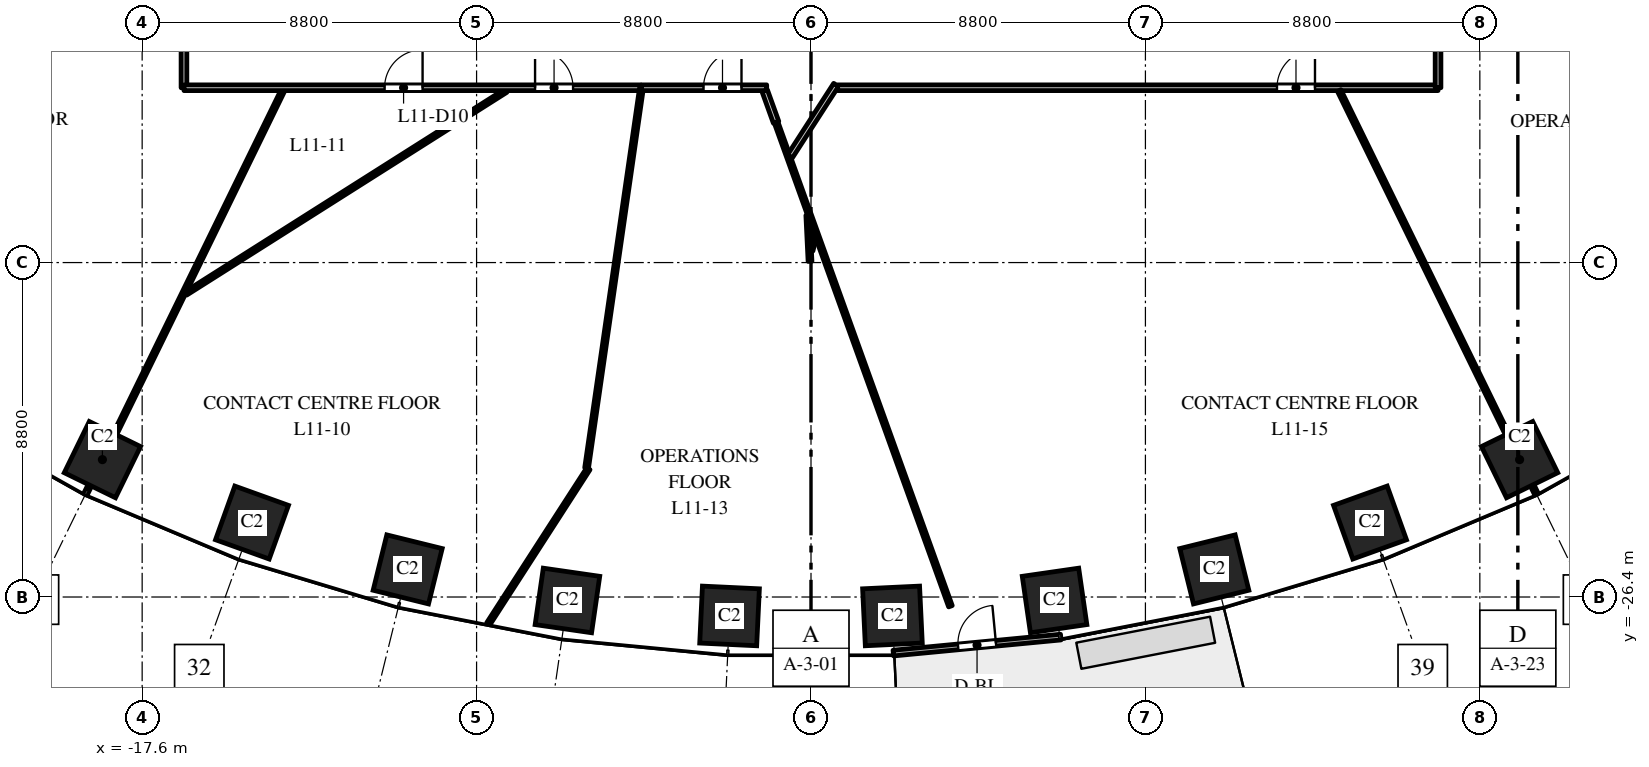
"""IFC4 building model, lengths in metres.
Left out: names, types, materials, properties, quantities, classifications, styles, units other than length and angle.
Written with IfcOpenShell. Run it as: python <this file> out.ifc"""

import sys

from ifc_helpers import new_model, si_unit, direction, frame, frame_2d, origin, origin_2d, place, context, subcontext, project, spatial, rectangle, extrude, element, fill, save


model = new_model("IFC4")
c1 = context("Model", 3, precision=1e-05, world=origin(), true_north=direction((0.0, 1.0)))
c2 = subcontext(c1, "Body", "Model", "MODEL_VIEW")
j1 = project(units=[si_unit("LENGTHUNIT", "METRE"), si_unit("PLANEANGLEUNIT", "RADIAN")], contexts=[c1])
p1 = place(None, origin())
s1 = spatial("IfcSite", under=j1, at=p1, CompositionType="ELEMENT")
p2 = place(p1, origin())
s2 = spatial("IfcBuilding", under=s1, at=p2, CompositionType="ELEMENT")
p3 = place(p2, frame((0.0, 0.0, 54.5)))
s3 = spatial("IfcBuildingStorey", under=s2, at=p3, CompositionType="ELEMENT", Elevation=54.5)
for number, where, z_axis, x_axis in (
    (1, (-18.646, -22.785, 0.0), (0.0, 0.0, 1.0), (0.898, -0.439, 0.0)),
    (2, (-14.709, -24.441, 0.0), (0.0, 0.0, 1.0), (0.941, -0.338, 0.0)),
    (3, (-10.613, -25.674, 0.0), (0.0, 0.0, 1.0), (0.971, -0.24, 0.0)),
    (4, (-6.409, -26.491, 0.0), (0.0, 0.0, 1.0), (0.99, -0.143, 0.0)),
    (5, (-2.143, -26.898, 0.0), (0.0, 0.0, 1.0), (0.999, -0.048, 0.0)),
    (6, (2.143, -26.898, 0.0), (0.0, 0.0, 1.0), (0.999, 0.048, 0.0)),
    (7, (6.409, -26.491, 0.0), (0.0, 0.0, 1.0), (0.99, 0.143, 0.0)),
    (8, (10.613, -25.674, 0.0), (0.0, 0.0, 1.0), (0.971, 0.24, 0.0)),
    (9, (14.709, -24.441, 0.0), (0.0, 0.0, 1.0), (0.941, 0.338, 0.0)),
    (10, (18.646, -22.785, 0.0), (0.0, 0.0, 1.0), (0.898, 0.439, 0.0)),
):
    element("IfcColumn", number, at=place(p3, frame(where, z_axis=z_axis, x_axis=x_axis)), inside=s3, PredefinedType="COLUMN", context=c2, shape_type="SweptSolid", body=[
        extrude(rectangle(XDim=1.5, YDim=1.5, at=origin_2d()), origin(), (0.0, 0.0, 1.0), 4.0),
    ])
p4 = place(p3, frame((2.166, -27.875, 0.0), z_axis=(0.0, 0.0, 1.0), x_axis=(0.995473879823, 0.095035543824, 0.0)))
e11 = element("IfcWall", 11, at=p4, inside=s3, PredefinedType="STANDARD", context=c2, shape_type="SweptSolid", body=[
    extrude(rectangle(XDim=4.426, YDim=0.15, at=frame_2d((2.213, 0.0))), origin(), (0.0, 0.0, 1.0), 3.7),
])
p5 = place(p4, frame((1.713, 0.0, 0.0)))
e12 = element("IfcOpeningElement", 12, at=p5, cuts=e11, PredefinedType="OPENING", context=c2, shape_type="SweptSolid", body=[
    extrude(rectangle(XDim=1.0, YDim=2.4, at=frame_2d((0.5, 1.2))), frame((0.0, 0.085, 0.0), z_axis=(0.0, -1.0, 0.0), x_axis=(1.0, 0.0, 0.0)), (0.0, 0.0, 1.0), 0.17),
])
p6 = place(p3, frame((-19.086, -23.685, 0.0), z_axis=(0.0, 0.0, 1.0), x_axis=(0.439199750603, 0.898389436197, 0.0)))
e13 = element("IfcWall", 13, at=p6, inside=s3, PredefinedType="PARTITIONING", context=c2, shape_type="SweptSolid", body=[
    extrude(rectangle(XDim=11.81, YDim=0.1, at=frame_2d((5.905, 0.0))), origin(), (0.0, 0.0, 1.0), 3.7),
])
p7 = place(p3, frame((-16.452, -18.412, 0.0), z_axis=(0.0, 0.0, 1.0), x_axis=(0.84481391066, 0.535060236194, 0.0)))
e14 = element("IfcWall", 14, at=p7, inside=s3, PredefinedType="PARTITIONING", context=c2, shape_type="SweptSolid", body=[
    extrude(rectangle(XDim=9.971, YDim=0.1, at=frame_2d((4.986, 0.0))), origin(), (0.0, 0.0, 1.0), 2.85),
])
p8 = place(p3, frame((-16.5, -13.0, 0.0), z_axis=(0.0, 0.0, 1.0), x_axis=(0.0, 1.0, 0.0)))
e15 = element("IfcWall", 15, at=p8, inside=s3, PredefinedType="PARTITIONING", context=c2, shape_type="SweptSolid", body=[
    extrude(rectangle(XDim=2.3, YDim=0.15, at=frame_2d((1.15, 0.0))), origin(), (0.0, 0.0, 1.0), 2.75),
])
p9 = place(p3, frame((-16.5, -13.0, 0.0), z_axis=(0.0, 0.0, 1.0), x_axis=(1.0, 0.0, 0.0)))
e16 = element("IfcWall", 16, at=p9, inside=s3, PredefinedType="PARTITIONING", context=c2, shape_type="SweptSolid", body=[
    extrude(rectangle(XDim=12.021, YDim=0.15, at=frame_2d((6.01, 0.0))), origin(), (0.0, 0.0, 1.0), 2.85),
])
p10 = place(p9, frame((9.239, 0.0, 0.0)))
e17 = element("IfcOpeningElement", 17, at=p10, cuts=e16, PredefinedType="OPENING", context=c2, shape_type="SweptSolid", body=[
    extrude(rectangle(XDim=1.0, YDim=2.1, at=frame_2d((0.5, 1.05))), frame((0.0, 0.085, 0.0), z_axis=(0.0, -1.0, 0.0), x_axis=(1.0, 0.0, 0.0)), (0.0, 0.0, 1.0), 0.17),
])
p11 = place(p9, frame((5.279, 0.0, 0.0)))
e18 = element("IfcOpeningElement", 18, at=p11, cuts=e16, PredefinedType="OPENING", context=c2, shape_type="SweptSolid", body=[
    extrude(rectangle(XDim=1.0, YDim=2.1, at=frame_2d((0.5, 1.05))), frame((0.0, 0.085, 0.0), z_axis=(0.0, -1.0, 0.0), x_axis=(1.0, 0.0, 0.0)), (0.0, 0.0, 1.0), 0.17),
])
p12 = place(p3, frame((-8.491, -27.104, 0.0), z_axis=(0.0, 0.0, 1.0), x_axis=(0.542285995048, 0.840193965448, 0.0)))
e19 = element("IfcWall", 19, at=p12, inside=s3, PredefinedType="PARTITIONING", context=c2, shape_type="SweptSolid", body=[
    extrude(rectangle(XDim=4.857, YDim=0.1, at=frame_2d((2.429, 0.0))), origin(), (0.0, 0.0, 1.0), 2.85),
])
p13 = place(p3, frame((-5.905, -23.005, 0.0), z_axis=(0.0, 0.0, 1.0), x_axis=(0.143007570509, 0.98972159458, 0.0)))
e20 = element("IfcWall", 20, at=p13, inside=s3, PredefinedType="PARTITIONING", context=c2, shape_type="SweptSolid", body=[
    extrude(rectangle(XDim=10.105, YDim=0.1, at=frame_2d((5.052, 0.0))), origin(), (0.0, 0.0, 1.0), 3.7),
])
p14 = place(p3, frame((-4.459, -13.0, 0.0), z_axis=(0.0, 0.0, 1.0), x_axis=(1.0, 0.0, 0.0)))
e21 = element("IfcWall", 21, at=p14, inside=s3, PredefinedType="PARTITIONING", context=c2, shape_type="SweptSolid", body=[
    extrude(rectangle(XDim=3.293, YDim=0.15, at=frame_2d((1.646, 0.0))), origin(), (0.0, 0.0, 1.0), 3.7),
])
p15 = place(p14, frame((1.63, 0.0, 0.0)))
e22 = element("IfcOpeningElement", 22, at=p15, cuts=e21, PredefinedType="OPENING", context=c2, shape_type="SweptSolid", body=[
    extrude(rectangle(XDim=1.0, YDim=2.1, at=frame_2d((0.5, 1.05))), frame((0.0, 0.085, 0.0), z_axis=(0.0, -1.0, 0.0), x_axis=(1.0, 0.0, 0.0)), (0.0, 0.0, 1.0), 0.17),
])
p16 = place(p3, frame((-1.218, -13.079, 0.0), z_axis=(0.0, 0.0, 1.0), x_axis=(0.339052677967, -0.940767389722, 0.0)))
e23 = element("IfcWall", 23, at=p16, inside=s3, PredefinedType="PARTITIONING", context=c2, shape_type="SweptSolid", body=[
    extrude(rectangle(XDim=0.882, YDim=0.15, at=frame_2d((0.441, 0.0))), origin(), (0.0, 0.0, 1.0), 2.85),
])
p17 = place(p3, frame((-0.916, -13.918, 0.0), z_axis=(0.0, 0.0, 1.0), x_axis=(0.338982154044, -0.940792803565, 0.0)))
e24 = element("IfcWall", 24, at=p17, inside=s3, PredefinedType="PARTITIONING", context=c2, shape_type="SweptSolid", body=[
    extrude(rectangle(XDim=13.526, YDim=0.1, at=frame_2d((6.763, 0.0))), origin(), (0.0, 0.0, 1.0), 2.85),
])
p18 = place(p3, frame((-0.084, -16.356, 0.0), z_axis=(0.0, 0.0, 1.0), x_axis=(0.047967320325, -0.998848905581, 0.0)))
e25 = element("IfcWall", 25, at=p18, inside=s3, PredefinedType="PARTITIONING", context=c2, shape_type="SweptSolid", body=[
    extrude(rectangle(XDim=1.211, YDim=0.1, at=frame_2d((0.606, 0.0))), origin(), (0.0, 0.0, 1.0), 3.7),
])
p19 = place(p3, frame((-0.554, -14.806, 0.0), z_axis=(0.0, 0.0, 1.0), x_axis=(0.542256038928, 0.840213299256, 0.0)))
e26 = element("IfcWall", 26, at=p19, inside=s3, PredefinedType="PARTITIONING", context=c2, shape_type="SweptSolid", body=[
    extrude(rectangle(XDim=2.239, YDim=0.15, at=frame_2d((1.119, 0.0))), origin(), (0.0, 0.0, 1.0), 3.7),
])
p20 = place(p3, frame((0.002, -17.284, 0.0), z_axis=(0.0, 0.0, 1.0), x_axis=(0.240121592304, 0.970742819139, 0.0)))
e27 = element("IfcWall", 27, at=p20, inside=s3, PredefinedType="PARTITIONING", context=c2, shape_type="SweptSolid", body=[
    extrude(rectangle(XDim=0.405, YDim=0.1, at=frame_2d((0.202, 0.0))), origin(), (0.0, 0.0, 1.0), 3.7),
])
p21 = place(p3, frame((0.701, -13.0, 0.0), z_axis=(0.0, 0.0, 1.0), x_axis=(1.0, 0.0, 0.0)))
e28 = element("IfcWall", 28, at=p21, inside=s3, PredefinedType="PARTITIONING", context=c2, shape_type="SweptSolid", body=[
    extrude(rectangle(XDim=15.799, YDim=0.15, at=frame_2d((7.899, 0.0))), origin(), (0.0, 0.0, 1.0), 2.85),
])
p22 = place(p21, frame((11.561, 0.0, 0.0)))
e29 = element("IfcOpeningElement", 29, at=p22, cuts=e28, PredefinedType="OPENING", context=c2, shape_type="SweptSolid", body=[
    extrude(rectangle(XDim=1.0, YDim=2.1, at=frame_2d((0.5, 1.05))), frame((0.0, 0.085, 0.0), z_axis=(0.0, -1.0, 0.0), x_axis=(1.0, 0.0, 0.0)), (0.0, 0.0, 1.0), 0.17),
])
p23 = place(p3, frame((13.899, -13.075, 0.0), z_axis=(0.0, 0.0, 1.0), x_axis=(0.439199750603, -0.898389436197, 0.0)))
e30 = element("IfcWall", 30, at=p23, inside=s3, PredefinedType="PARTITIONING", context=c2, shape_type="SweptSolid", body=[
    extrude(rectangle(XDim=11.81, YDim=0.1, at=frame_2d((5.905, 0.0))), origin(), (0.0, 0.0, 1.0), 2.85),
])
p24 = place(p3, frame((16.5, -13.0, 0.0), z_axis=(0.0, 0.0, 1.0), x_axis=(0.0, 1.0, 0.0)))
e31 = element("IfcWall", 31, at=p24, inside=s3, PredefinedType="PARTITIONING", context=c2, shape_type="SweptSolid", body=[
    extrude(rectangle(XDim=2.3, YDim=0.15, at=frame_2d((1.15, 0.0))), origin(), (0.0, 0.0, 1.0), 3.7),
])
p25 = place(p5, origin())
e32 = element("IfcDoor", 32, at=p25, inside=s3, OperationType="SINGLE_SWING_RIGHT", PredefinedType="DOOR", context=c2, shape_type="SweptSolid", body=[
    extrude(rectangle(XDim=1.0, YDim=2.4, at=frame_2d((0.5, 1.2))), frame((0.0, 0.025, 0.0), z_axis=(0.0, -1.0, 0.0), x_axis=(1.0, 0.0, 0.0)), (0.0, 0.0, 1.0), 0.05),
])
fill(e12, e32)
p26 = place(p10, origin())
e33 = element("IfcDoor", 33, at=p26, inside=s3, OperationType="SINGLE_SWING_LEFT", PredefinedType="DOOR", context=c2, shape_type="SweptSolid", body=[
    extrude(rectangle(XDim=1.0, YDim=2.1, at=frame_2d((0.5, 1.05))), frame((0.0, 0.025, 0.0), z_axis=(0.0, -1.0, 0.0), x_axis=(1.0, 0.0, 0.0)), (0.0, 0.0, 1.0), 0.05),
])
fill(e17, e33)
p27 = place(p11, origin())
e34 = element("IfcDoor", 34, at=p27, inside=s3, OperationType="SINGLE_SWING_RIGHT", PredefinedType="DOOR", context=c2, shape_type="SweptSolid", body=[
    extrude(rectangle(XDim=1.0, YDim=2.1, at=frame_2d((0.5, 1.05))), frame((0.0, 0.025, 0.0), z_axis=(0.0, -1.0, 0.0), x_axis=(1.0, 0.0, 0.0)), (0.0, 0.0, 1.0), 0.05),
])
fill(e18, e34)
p28 = place(p15, origin())
e35 = element("IfcDoor", 35, at=p28, inside=s3, OperationType="SINGLE_SWING_RIGHT", PredefinedType="DOOR", context=c2, shape_type="SweptSolid", body=[
    extrude(rectangle(XDim=1.0, YDim=2.1, at=frame_2d((0.5, 1.05))), frame((0.0, 0.025, 0.0), z_axis=(0.0, -1.0, 0.0), x_axis=(1.0, 0.0, 0.0)), (0.0, 0.0, 1.0), 0.05),
])
fill(e22, e35)
p29 = place(p22, origin())
e36 = element("IfcDoor", 36, at=p29, inside=s3, OperationType="SINGLE_SWING_RIGHT", PredefinedType="DOOR", context=c2, shape_type="SweptSolid", body=[
    extrude(rectangle(XDim=1.0, YDim=2.1, at=frame_2d((0.5, 1.05))), frame((0.0, 0.025, 0.0), z_axis=(0.0, -1.0, 0.0), x_axis=(1.0, 0.0, 0.0)), (0.0, 0.0, 1.0), 0.05),
])
fill(e29, e36)
save(model, sys.argv[1])
